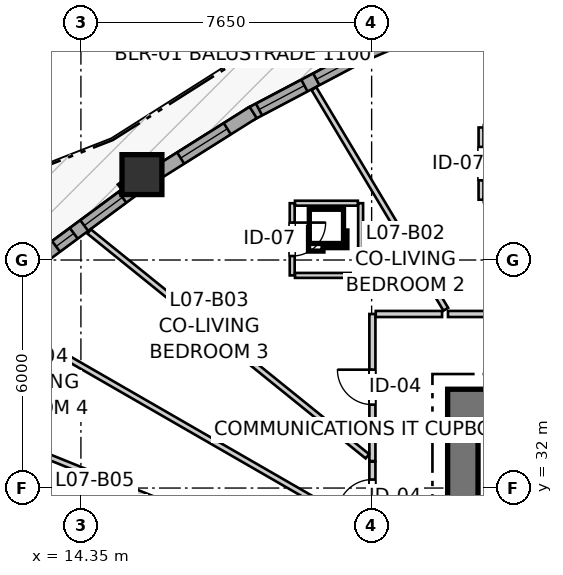
"""IFC4 building model, lengths in metres.
Left out: names, types, materials, properties, quantities, classifications, styles, units other than length and angle.
Written with IfcOpenShell. Run it as: python <this file> out.ifc"""

import sys

from ifc_helpers import new_model, si_unit, direction, frame, frame_2d, origin, origin_2d, place, context, subcontext, project, spatial, rectangle, i_section, extrude, source, transform, mapped, element, fill, save


model = new_model("IFC4")
c1 = context("Model", 3, precision=1e-05, world=origin(), true_north=direction((0.0, 1.0)))
c2 = subcontext(c1, "Body", "Model", "MODEL_VIEW")
j1 = project(units=[si_unit("LENGTHUNIT", "METRE"), si_unit("PLANEANGLEUNIT", "RADIAN")], contexts=[c1])
p1 = place(None, origin())
s1 = spatial("IfcSite", under=j1, at=p1, CompositionType="ELEMENT")
p2 = place(p1, origin())
s2 = spatial("IfcBuilding", under=s1, at=p2, CompositionType="ELEMENT")
p3 = place(p2, frame((0.0, 0.0, 27.0)))
s3 = spatial("IfcBuildingStorey", under=s2, at=p3, CompositionType="ELEMENT", Elevation=27.0)
p4 = place(p3, frame((36.7, 34.2, 0.0), z_axis=(0.0, 0.0, 1.0), x_axis=(-1.0, 0.0, 0.0)))
e1 = element("IfcWall", 1, at=p4, inside=s3, PredefinedType="SHEAR", context=c2, shape_type="SweptSolid", body=[
    extrude(rectangle(XDim=12.7, YDim=0.8, at=frame_2d((6.35, 0.0))), origin(), (0.0, 0.0, 1.0), 2.935),
])
p5 = place(p3, frame((24.4, 33.8, 0.0), z_axis=(0.0, 0.0, 1.0), x_axis=(0.0, -1.0, 0.0)))
e2 = element("IfcWall", 2, at=p5, inside=s3, PredefinedType="SHEAR", context=c2, shape_type="SweptSolid", body=[
    extrude(rectangle(XDim=15.6, YDim=0.8, at=frame_2d((7.8, 0.0))), origin(), (0.0, 0.0, 1.0), 2.935),
])
p6 = place(p5, frame((7.05, 0.0, 0.0)))
e3 = element("IfcOpeningElement", 3, at=p6, cuts=e2, PredefinedType="OPENING", context=c2, shape_type="SweptSolid", body=[
    extrude(rectangle(XDim=1.5, YDim=2.15, at=frame_2d((0.75, 1.075))), frame((0.0, 0.41, 0.0), z_axis=(0.0, -1.0, 0.0), x_axis=(1.0, 0.0, 0.0)), (0.0, 0.0, 1.0), 0.82),
])
p7 = place(p5, frame((3.52, 0.0, 0.0)))
e4 = element("IfcOpeningElement", 4, at=p7, cuts=e2, PredefinedType="OPENING", context=c2, shape_type="SweptSolid", body=[
    extrude(rectangle(XDim=0.86, YDim=2.05, at=frame_2d((0.43, 1.025))), frame((0.0, 0.41, 0.0), z_axis=(0.0, -1.0, 0.0), x_axis=(1.0, 0.0, 0.0)), (0.0, 0.0, 1.0), 0.82),
])
p8 = place(p5, frame((11.22, 0.0, 0.0)))
e5 = element("IfcOpeningElement", 5, at=p8, cuts=e2, PredefinedType="OPENING", context=c2, shape_type="SweptSolid", body=[
    extrude(rectangle(XDim=0.86, YDim=2.05, at=frame_2d((0.43, 1.025))), frame((0.0, 0.41, 0.0), z_axis=(0.0, -1.0, 0.0), x_axis=(1.0, 0.0, 0.0)), (0.0, 0.0, 1.0), 0.82),
])
m1 = source(origin(), c2, "Body", "SweptSolid", [
    extrude(i_section(OverallWidth=0.409, OverallDepth=0.425, WebThickness=0.03, FlangeThickness=0.048, FilletRadius=0.015, at=origin_2d()), origin(), (0.0, 0.0, 1.0), 2.935),
])
p9 = place(p3, frame((21.683, 43.554, 0.0), z_axis=(0.0, 0.0, 1.0), x_axis=(1.0, 0.0, 0.0)))
e6 = element("IfcColumn", 6, at=p9, inside=s3, PredefinedType="PILASTER", context=c2, shape_type="MappedRepresentation", body=[
    mapped(m1, transform((0.0, 0.0, 0.0), x_axis=(1.0, 0.0, 0.0), y_axis=(0.0, 1.0, 0.0), z_axis=(0.0, 0.0, 1.0), scale=1.0)),
])
m2 = source(origin(), c2, "Body", "SweptSolid", [
    extrude(rectangle(XDim=1.05, YDim=1.05, at=origin_2d()), origin(), (0.0, 0.0, 1.0), 2.935),
])
p10 = place(p3, frame((15.956, 40.247, 0.0), z_axis=(0.0, 0.0, 1.0), x_axis=(1.0, 0.0, 0.0)))
e7 = element("IfcColumn", 7, at=p10, inside=s3, PredefinedType="COLUMN", context=c2, shape_type="MappedRepresentation", body=[
    mapped(m2, transform((0.0, 0.0, 0.0), x_axis=(1.0, 0.0, 0.0), y_axis=(0.0, 1.0, 0.0), z_axis=(0.0, 0.0, 1.0), scale=1.0)),
])
p11 = place(p3, frame((24.84, 44.735, 0.0), z_axis=(0.0, 0.0, 1.0), x_axis=(-0.917090935142, -0.398678086532, 0.0)))
e8 = element("IfcWall", 8, at=p11, inside=s3, PredefinedType="SOLIDWALL", context=c2, shape_type="SweptSolid", body=[
    extrude(rectangle(XDim=3.346, YDim=0.35, at=frame_2d((1.673, 0.0))), origin(), (0.0, 0.0, 1.0), 2.415),
])
p12 = place(p11, frame((1.108, 0.0, 0.82)))
e9 = element("IfcOpeningElement", 9, at=p12, cuts=e8, PredefinedType="OPENING", context=c2, shape_type="SweptSolid", body=[
    extrude(rectangle(XDim=1.15, YDim=1.2, at=frame_2d((0.575, 0.6))), frame((0.0, 0.185, 0.0), z_axis=(0.0, -1.0, 0.0), x_axis=(1.0, 0.0, 0.0)), (0.0, 0.0, 1.0), 0.37),
])
p13 = place(p3, frame((21.747, 43.39, 0.0), z_axis=(0.0, 0.0, 1.0), x_axis=(-0.88437802144, -0.46677137358, 0.0)))
e10 = element("IfcWall", 10, at=p13, inside=s3, PredefinedType="SOLIDWALL", context=c2, shape_type="SweptSolid", body=[
    extrude(rectangle(XDim=3.327, YDim=0.35, at=frame_2d((1.664, 0.0))), origin(), (0.0, 0.0, 1.0), 2.415),
])
p14 = place(p13, frame((0.311, 0.0, 0.82)))
e11 = element("IfcOpeningElement", 11, at=p14, cuts=e10, PredefinedType="OPENING", context=c2, shape_type="SweptSolid", body=[
    extrude(rectangle(XDim=1.05, YDim=1.45, at=frame_2d((0.525, 0.725))), frame((0.0, 0.185, 0.0), z_axis=(0.0, -1.0, 0.0), x_axis=(1.0, 0.0, 0.0)), (0.0, 0.0, 1.0), 0.37),
])
p15 = place(p13, frame((1.714, 0.0, 0.82)))
e12 = element("IfcOpeningElement", 12, at=p15, cuts=e10, PredefinedType="OPENING", context=c2, shape_type="SweptSolid", body=[
    extrude(rectangle(XDim=1.35, YDim=1.45, at=frame_2d((0.675, 0.725))), frame((0.0, 0.185, 0.0), z_axis=(0.0, -1.0, 0.0), x_axis=(1.0, 0.0, 0.0)), (0.0, 0.0, 1.0), 0.37),
])
p16 = place(p3, frame((18.882, 41.882, 0.0), z_axis=(0.0, 0.0, 1.0), x_axis=(-0.846428134238, -0.53250297048, 0.0)))
e13 = element("IfcWall", 13, at=p16, inside=s3, PredefinedType="SOLIDWALL", context=c2, shape_type="SweptSolid", body=[
    extrude(rectangle(XDim=3.047, YDim=0.35, at=frame_2d((1.523, 0.0))), origin(), (0.0, 0.0, 1.0), 2.415),
])
p17 = place(p16, frame((0.803, 0.0, 0.82)))
e14 = element("IfcOpeningElement", 14, at=p17, cuts=e13, PredefinedType="OPENING", context=c2, shape_type="SweptSolid", body=[
    extrude(rectangle(XDim=1.45, YDim=1.25, at=frame_2d((0.725, 0.625))), frame((0.0, 0.185, 0.0), z_axis=(0.0, -1.0, 0.0), x_axis=(1.0, 0.0, 0.0)), (0.0, 0.0, 1.0), 0.37),
])
p18 = place(p3, frame((15.819, 39.928, 0.0), z_axis=(0.0, 0.0, 1.0), x_axis=(-0.803825144674, -0.594865645999, 0.0)))
e15 = element("IfcWall", 15, at=p18, inside=s3, PredefinedType="SOLIDWALL", context=c2, shape_type="SweptSolid", body=[
    extrude(rectangle(XDim=3.066, YDim=0.35, at=frame_2d((1.533, 0.0))), origin(), (0.0, 0.0, 1.0), 2.415),
])
p19 = place(p18, frame((0.469, 0.0, 0.82)))
e16 = element("IfcOpeningElement", 16, at=p19, cuts=e15, PredefinedType="OPENING", context=c2, shape_type="SweptSolid", body=[
    extrude(rectangle(XDim=1.25, YDim=1.35, at=frame_2d((0.625, 0.675))), frame((0.0, 0.185, 0.0), z_axis=(0.0, -1.0, 0.0), x_axis=(1.0, 0.0, 0.0)), (0.0, 0.0, 1.0), 0.37),
])
p20 = place(p18, frame((2.062, 0.0, 0.82)))
e17 = element("IfcOpeningElement", 17, at=p20, cuts=e15, PredefinedType="OPENING", context=c2, shape_type="SweptSolid", body=[
    extrude(rectangle(XDim=0.58, YDim=1.35, at=frame_2d((0.29, 0.675))), frame((0.0, 0.185, 0.0), z_axis=(0.0, -1.0, 0.0), x_axis=(1.0, 0.0, 0.0)), (0.0, 0.0, 1.0), 0.37),
])
p21 = place(p3, frame((22.02, 32.71, 0.0), z_axis=(0.0, 0.0, 1.0), x_axis=(0.0, 1.0, 0.0)))
e18 = element("IfcWall", 18, at=p21, inside=s3, PredefinedType="PARTITIONING", context=c2, shape_type="SweptSolid", body=[
    extrude(rectangle(XDim=3.87, YDim=0.16, at=frame_2d((1.935, 0.0))), origin(), (0.0, 0.0, 1.0), 2.935),
])
p22 = place(p21, frame((1.485, 0.0, 0.0)))
e19 = element("IfcOpeningElement", 19, at=p22, cuts=e18, PredefinedType="OPENING", context=c2, shape_type="SweptSolid", body=[
    extrude(rectangle(XDim=0.92, YDim=2.1, at=frame_2d((0.46, 1.05))), frame((0.0, 0.09, 0.0), z_axis=(0.0, -1.0, 0.0), x_axis=(1.0, 0.0, 0.0)), (0.0, 0.0, 1.0), 0.18),
])
p23 = place(p3, frame((24.009, 36.58, 0.0), z_axis=(0.0, 0.0, 1.0), x_axis=(1.0, 0.0, 0.0)))
e20 = element("IfcWall", 20, at=p23, inside=s3, PredefinedType="PARTITIONING", context=c2, shape_type="SweptSolid", body=[
    extrude(rectangle(XDim=3.822, YDim=0.16, at=frame_2d((1.911, 0.0))), origin(), (0.0, 0.0, 1.0), 2.543),
])
p24 = place(p23, frame((1.452, 0.0, 0.0)))
e21 = element("IfcOpeningElement", 21, at=p24, cuts=e20, PredefinedType="OPENING", context=c2, shape_type="SweptSolid", body=[
    extrude(rectangle(XDim=0.92, YDim=2.1, at=frame_2d((0.46, 1.05))), frame((0.0, 0.09, 0.0), z_axis=(0.0, -1.0, 0.0), x_axis=(1.0, 0.0, 0.0)), (0.0, 0.0, 1.0), 0.18),
])
p25 = place(p3, frame((22.02, 30.782, 0.0), z_axis=(0.0, 0.0, 1.0), x_axis=(0.0, 1.0, 0.0)))
e22 = element("IfcWall", 22, at=p25, inside=s3, PredefinedType="PARTITIONING", context=c2, shape_type="SweptSolid", body=[
    extrude(rectangle(XDim=1.913, YDim=0.16, at=frame_2d((0.957, 0.0))), origin(), (0.0, 0.0, 1.0), 2.935),
])
p26 = place(p25, frame((0.522, 0.0, 0.0)))
e23 = element("IfcOpeningElement", 23, at=p26, cuts=e22, PredefinedType="OPENING", context=c2, shape_type="SweptSolid", body=[
    extrude(rectangle(XDim=0.92, YDim=2.1, at=frame_2d((0.46, 1.05))), frame((0.0, 0.09, 0.0), z_axis=(0.0, -1.0, 0.0), x_axis=(1.0, 0.0, 0.0)), (0.0, 0.0, 1.0), 0.18),
])
p27 = place(p3, frame((24.879, 41.487, 0.0), z_axis=(0.0, 0.0, 1.0), x_axis=(0.0, -1.0, 0.0)))
e24 = element("IfcWall", 24, at=p27, inside=s3, PredefinedType="PARTITIONING", context=c2, shape_type="SweptSolid", body=[
    extrude(rectangle(XDim=1.9, YDim=0.13, at=frame_2d((0.95, 0.0))), origin(), (0.0, 0.0, 1.0), 2.935),
])
p28 = place(p27, frame((0.51, 0.0, 0.0)))
e25 = element("IfcOpeningElement", 25, at=p28, cuts=e24, PredefinedType="OPENING", context=c2, shape_type="SweptSolid", body=[
    extrude(rectangle(XDim=0.88, YDim=2.05, at=frame_2d((0.44, 1.025))), frame((0.0, 0.075, 0.0), z_axis=(0.0, -1.0, 0.0), x_axis=(1.0, 0.0, 0.0)), (0.0, 0.0, 1.0), 0.15),
])
p29 = place(p3, frame((19.91, 39.495, 0.0), z_axis=(0.0, 0.0, 1.0), x_axis=(0.0, -1.0, 0.0)))
e26 = element("IfcWall", 26, at=p29, inside=s3, PredefinedType="PARTITIONING", context=c2, shape_type="SweptSolid", body=[
    extrude(rectangle(XDim=1.9, YDim=0.13, at=frame_2d((0.95, 0.0))), origin(), (0.0, 0.0, 1.0), 2.935),
])
p30 = place(p29, frame((0.51, 0.0, 0.0)))
e27 = element("IfcOpeningElement", 27, at=p30, cuts=e26, PredefinedType="OPENING", context=c2, shape_type="SweptSolid", body=[
    extrude(rectangle(XDim=0.88, YDim=2.05, at=frame_2d((0.44, 1.025))), frame((0.0, 0.075, 0.0), z_axis=(0.0, -1.0, 0.0), x_axis=(1.0, 0.0, 0.0)), (0.0, 0.0, 1.0), 0.15),
])
p31 = place(p3, frame((9.577, 34.41, 0.0), z_axis=(0.0, 0.0, 1.0), x_axis=(0.926920362809, -0.375258099194, 0.0)))
e28 = element("IfcWall", 28, at=p31, inside=s3, PredefinedType="PARTITIONING", context=c2, shape_type="SweptSolid", body=[
    extrude(rectangle(XDim=13.3, YDim=0.145, at=frame_2d((6.65, 0.0))), origin(), (0.0, 0.0, 1.0), 2.935),
])
p32 = place(p3, frame((11.92, 36.618, 0.0), z_axis=(0.0, 0.0, 1.0), x_axis=(0.866473494239, -0.499223080177, 0.0)))
e29 = element("IfcWall", 29, at=p32, inside=s3, PredefinedType="PARTITIONING", context=c2, shape_type="SweptSolid", body=[
    extrude(rectangle(XDim=11.514, YDim=0.145, at=frame_2d((5.757, 0.0))), origin(), (0.0, 0.0, 1.0), 2.935),
])
p33 = place(p3, frame((14.566, 38.751, 0.0), z_axis=(0.0, 0.0, 1.0), x_axis=(0.777881688073, -0.628410756879, 0.0)))
e30 = element("IfcWall", 30, at=p33, inside=s3, PredefinedType="PARTITIONING", context=c2, shape_type="SweptSolid", body=[
    extrude(rectangle(XDim=9.413, YDim=0.145, at=frame_2d((4.707, 0.0))), origin(), (0.0, 0.0, 1.0), 2.935),
])
p34 = place(p3, frame((20.481, 42.51, 0.0), z_axis=(0.0, 0.0, 1.0), x_axis=(0.513067331262, -0.858348363773, 0.0)))
e31 = element("IfcWall", 31, at=p34, inside=s3, PredefinedType="PARTITIONING", context=c2, shape_type="SweptSolid", body=[
    extrude(rectangle(XDim=6.765, YDim=0.145, at=frame_2d((3.382, 0.0))), origin(), (0.0, 0.0, 1.0), 2.935),
])
p35 = place(p3, frame((22.108, 36.58, 0.0), z_axis=(0.0, 0.0, 1.0), x_axis=(1.0, 0.0, 0.0)))
e32 = element("IfcWall", 32, at=p35, inside=s3, PredefinedType="PARTITIONING", context=c2, shape_type="SweptSolid", body=[
    extrude(rectangle(XDim=1.746, YDim=0.16, at=frame_2d((0.873, 0.0))), origin(), (0.0, 0.0, 1.0), 2.543),
])
p36 = place(p3, frame((21.71, 37.595, 0.0), z_axis=(0.0, 0.0, 1.0), x_axis=(0.0, 1.0, 0.0)))
e33 = element("IfcWall", 33, at=p36, inside=s3, PredefinedType="PARTITIONING", context=c2, shape_type="SweptSolid", body=[
    extrude(rectangle(XDim=1.9, YDim=0.13, at=frame_2d((0.95, 0.0))), origin(), (0.0, 0.0, 1.0), 2.935),
])
for number, where, z_axis, x_axis in (
    (34, (19.983, 39.495, 0.0), (0.0, 0.0, 1.0), (1.0, 0.0, 0.0)),
    (35, (19.983, 37.595, 0.0), (0.0, 0.0, 1.0), (1.0, 0.0, 0.0)),
):
    element("IfcWall", number, at=place(p3, frame(where, z_axis=z_axis, x_axis=x_axis)), inside=s3, PredefinedType="PARTITIONING", context=c2, shape_type="SweptSolid", body=[
        extrude(rectangle(XDim=1.654, YDim=0.13, at=frame_2d((0.827, 0.0))), origin(), (0.0, 0.0, 1.0), 2.935),
    ])
p37 = place(p3, frame((24.952, 39.587, 0.0), z_axis=(0.0, 0.0, 1.0), x_axis=(1.0, 0.0, 0.0)))
e36 = element("IfcWall", 36, at=p37, inside=s3, PredefinedType="PARTITIONING", context=c2, shape_type="SweptSolid", body=[
    extrude(rectangle(XDim=1.727, YDim=0.13, at=frame_2d((0.864, 0.0))), origin(), (0.0, 0.0, 1.0), 2.935),
])
p38 = place(p3, frame((24.952, 41.487, 0.0), z_axis=(0.0, 0.0, 1.0), x_axis=(1.0, 0.0, 0.0)))
e37 = element("IfcWall", 37, at=p38, inside=s3, PredefinedType="PARTITIONING", context=c2, shape_type="SweptSolid", body=[
    extrude(rectangle(XDim=1.59, YDim=0.13, at=frame_2d((0.795, 0.0))), origin(), (0.0, 0.0, 1.0), 2.503),
])
m3 = source(origin(), c2, "Body", "SweptSolid", [
    extrude(rectangle(XDim=1.05, YDim=1.45, at=frame_2d((0.525, 0.725))), frame((0.0, 0.03, 0.0), z_axis=(0.0, -1.0, 0.0), x_axis=(1.0, 0.0, 0.0)), (0.0, 0.0, 1.0), 0.06),
])
p39 = place(p14, origin())
e38 = element("IfcWindow", 38, at=p39, inside=s3, PartitioningType="SINGLE_PANEL", PredefinedType="WINDOW", context=c2, shape_type="MappedRepresentation", body=[
    mapped(m3, transform((0.0, 0.0, 0.0), x_axis=(1.0, 0.0, 0.0), y_axis=(0.0, 1.0, 0.0), z_axis=(0.0, 0.0, 1.0), scale=1.0)),
])
fill(e11, e38)
m4 = source(origin(), c2, "Body", "SweptSolid", [
    extrude(rectangle(XDim=1.35, YDim=1.45, at=frame_2d((0.675, 0.725))), frame((0.0, 0.03, 0.0), z_axis=(0.0, -1.0, 0.0), x_axis=(1.0, 0.0, 0.0)), (0.0, 0.0, 1.0), 0.06),
])
p40 = place(p15, origin())
e39 = element("IfcWindow", 39, at=p40, inside=s3, PartitioningType="SINGLE_PANEL", PredefinedType="WINDOW", context=c2, shape_type="MappedRepresentation", body=[
    mapped(m4, transform((0.0, 0.0, 0.0), x_axis=(1.0, 0.0, 0.0), y_axis=(0.0, 1.0, 0.0), z_axis=(0.0, 0.0, 1.0), scale=1.0)),
])
fill(e12, e39)
m5 = source(origin(), c2, "Body", "SweptSolid", [
    extrude(rectangle(XDim=1.45, YDim=1.25, at=frame_2d((0.725, 0.625))), frame((0.0, 0.03, 0.0), z_axis=(0.0, -1.0, 0.0), x_axis=(1.0, 0.0, 0.0)), (0.0, 0.0, 1.0), 0.06),
])
p41 = place(p17, origin())
e40 = element("IfcWindow", 40, at=p41, inside=s3, PartitioningType="SINGLE_PANEL", PredefinedType="WINDOW", context=c2, shape_type="MappedRepresentation", body=[
    mapped(m5, transform((0.0, 0.0, 0.0), x_axis=(1.0, 0.0, 0.0), y_axis=(0.0, 1.0, 0.0), z_axis=(0.0, 0.0, 1.0), scale=1.0)),
])
fill(e14, e40)
m6 = source(origin(), c2, "Body", "SweptSolid", [
    extrude(rectangle(XDim=1.25, YDim=1.35, at=frame_2d((0.625, 0.675))), frame((0.0, 0.03, 0.0), z_axis=(0.0, -1.0, 0.0), x_axis=(1.0, 0.0, 0.0)), (0.0, 0.0, 1.0), 0.06),
])
p42 = place(p19, origin())
e41 = element("IfcWindow", 41, at=p42, inside=s3, PartitioningType="SINGLE_PANEL", PredefinedType="WINDOW", context=c2, shape_type="MappedRepresentation", body=[
    mapped(m6, transform((0.0, 0.0, 0.0), x_axis=(1.0, 0.0, 0.0), y_axis=(0.0, 1.0, 0.0), z_axis=(0.0, 0.0, 1.0), scale=1.0)),
])
fill(e16, e41)
m7 = source(origin(), c2, "Body", "SweptSolid", [
    extrude(rectangle(XDim=0.58, YDim=1.35, at=frame_2d((0.29, 0.675))), frame((0.0, 0.03, 0.0), z_axis=(0.0, -1.0, 0.0), x_axis=(1.0, 0.0, 0.0)), (0.0, 0.0, 1.0), 0.06),
])
p43 = place(p20, origin())
e42 = element("IfcWindow", 42, at=p43, inside=s3, PartitioningType="SINGLE_PANEL", PredefinedType="WINDOW", context=c2, shape_type="MappedRepresentation", body=[
    mapped(m7, transform((0.0, 0.0, 0.0), x_axis=(1.0, 0.0, 0.0), y_axis=(0.0, 1.0, 0.0), z_axis=(0.0, 0.0, 1.0), scale=1.0)),
])
fill(e17, e42)
m8 = source(origin(), c2, "Body", "SweptSolid", [
    extrude(rectangle(XDim=0.92, YDim=2.1, at=frame_2d((0.46, 1.05))), frame((0.0, 0.025, 0.0), z_axis=(0.0, -1.0, 0.0), x_axis=(1.0, 0.0, 0.0)), (0.0, 0.0, 1.0), 0.05),
])
p44 = place(p22, origin())
e43 = element("IfcDoor", 43, at=p44, inside=s3, OperationType="SINGLE_SWING_RIGHT", PredefinedType="DOOR", context=c2, shape_type="MappedRepresentation", body=[
    mapped(m8, transform((0.0, 0.0, 0.0), x_axis=(1.0, 0.0, 0.0), y_axis=(0.0, 1.0, 0.0), z_axis=(0.0, 0.0, 1.0), scale=1.0)),
])
fill(e19, e43)
p45 = place(p26, origin())
e44 = element("IfcDoor", 44, at=p45, inside=s3, OperationType="SINGLE_SWING_LEFT", PredefinedType="DOOR", context=c2, shape_type="MappedRepresentation", body=[
    mapped(m8, transform((0.0, 0.0, 0.0), x_axis=(1.0, 0.0, 0.0), y_axis=(0.0, 1.0, 0.0), z_axis=(0.0, 0.0, 1.0), scale=1.0)),
])
fill(e23, e44)
m9 = source(origin(), c2, "Body", "SweptSolid", [
    extrude(rectangle(XDim=0.88, YDim=2.05, at=frame_2d((0.44, 1.025))), frame((0.0, 0.025, 0.0), z_axis=(0.0, -1.0, 0.0), x_axis=(1.0, 0.0, 0.0)), (0.0, 0.0, 1.0), 0.05),
])
p46 = place(p28, origin())
e45 = element("IfcDoor", 45, at=p46, inside=s3, OperationType="SINGLE_SWING_RIGHT", PredefinedType="DOOR", context=c2, shape_type="MappedRepresentation", body=[
    mapped(m9, transform((0.0, 0.0, 0.0), x_axis=(1.0, 0.0, 0.0), y_axis=(0.0, 1.0, 0.0), z_axis=(0.0, 0.0, 1.0), scale=1.0)),
])
fill(e25, e45)
p47 = place(p30, origin())
e46 = element("IfcDoor", 46, at=p47, inside=s3, OperationType="SINGLE_SWING_LEFT", PredefinedType="DOOR", context=c2, shape_type="MappedRepresentation", body=[
    mapped(m9, transform((0.0, 0.0, 0.0), x_axis=(1.0, 0.0, 0.0), y_axis=(0.0, 1.0, 0.0), z_axis=(0.0, 0.0, 1.0), scale=1.0)),
])
fill(e27, e46)
save(model, sys.argv[1])
